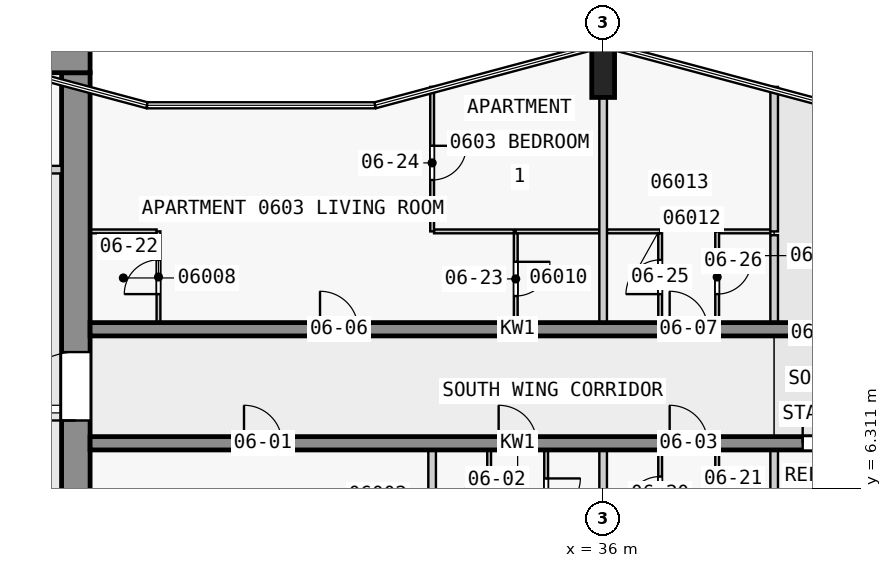
"""IFC4 building model, lengths in metres.
Left out: names, types, materials, properties, quantities, classifications, styles, units other than length and angle.
Written with IfcOpenShell. Run it as: python <this file> out.ifc"""

import sys

from ifc_helpers import new_model, si_unit, direction, frame, frame_2d, origin, origin_2d, place, context, subcontext, project, spatial, rectangle, extrude, element, fill, save


model = new_model("IFC4")
c1 = context("Model", 3, precision=1e-05, world=origin(), true_north=direction((0.0, 1.0)))
c2 = subcontext(c1, "Body", "Model", "MODEL_VIEW")
j1 = project(units=[si_unit("LENGTHUNIT", "METRE"), si_unit("PLANEANGLEUNIT", "RADIAN")], contexts=[c1])
p1 = place(None, origin())
s1 = spatial("IfcSite", under=j1, at=p1, CompositionType="ELEMENT")
p2 = place(p1, origin())
s2 = spatial("IfcBuilding", under=s1, at=p2, CompositionType="ELEMENT")
p3 = place(p2, frame((0.0, 0.0, 30.3)))
s3 = spatial("IfcBuildingStorey", under=s2, at=p3, CompositionType="ELEMENT", Elevation=30.3)
p4 = place(p3, frame((36.0, 17.3, 0.0), z_axis=(0.0, 0.0, 1.0), x_axis=(1.0, 0.0, 0.0)))
e1 = element("IfcColumn", 1, at=p4, inside=s3, PredefinedType="COLUMN", context=c2, shape_type="SweptSolid", body=[
    extrude(rectangle(XDim=0.6, YDim=1.4, at=origin_2d()), origin(), (0.0, 0.0, 1.0), 3.5),
])
p5 = place(p3, frame((1.55, 17.625, 0.0), z_axis=(0.0, 0.0, 1.0), x_axis=(1.0, 0.0, 0.0)))
e2 = element("IfcWall", 2, at=p5, inside=s3, PredefinedType="SHEAR", context=c2, shape_type="SweptSolid", body=[
    extrude(rectangle(XDim=20.95, YDim=0.75, at=frame_2d((10.475, 0.0))), origin(), (0.0, 0.0, 1.0), 3.25),
])
p6 = place(p5, frame((6.55, 0.0, 0.0)))
e3 = element("IfcOpeningElement", 3, at=p6, cuts=e2, PredefinedType="OPENING", context=c2, shape_type="SweptSolid", body=[
    extrude(rectangle(XDim=1.8, YDim=2.1, at=frame_2d((0.9, 1.05))), frame((0.0, 0.385, 0.0), z_axis=(0.0, -1.0, 0.0), x_axis=(1.0, 0.0, 0.0)), (0.0, 0.0, 1.0), 0.77),
])
p7 = place(p3, frame((22.125, 2.5, 0.0), z_axis=(0.0, 0.0, 1.0), x_axis=(0.0, 1.0, 0.0)))
e4 = element("IfcWall", 4, at=p7, inside=s3, PredefinedType="SHEAR", context=c2, shape_type="SweptSolid", body=[
    extrude(rectangle(XDim=14.75, YDim=0.75, at=frame_2d((7.375, 0.0))), origin(), (0.0, 0.0, 1.0), 3.25),
])
p8 = place(p7, frame((5.6, 0.0, 0.0)))
e5 = element("IfcOpeningElement", 5, at=p8, cuts=e4, PredefinedType="OPENING", context=c2, shape_type="SweptSolid", body=[
    extrude(rectangle(XDim=1.8, YDim=2.1, at=frame_2d((0.9, 1.05))), frame((0.0, 0.385, 0.0), z_axis=(0.0, -1.0, 0.0), x_axis=(1.0, 0.0, 0.0)), (0.0, 0.0, 1.0), 0.77),
])
p9 = place(p3, frame((22.5, 7.5, 0.0), z_axis=(0.0, 0.0, 1.0), x_axis=(1.0, 0.0, 0.0)))
e6 = element("IfcWall", 6, at=p9, inside=s3, PredefinedType="SHEAR", context=c2, shape_type="SweptSolid", body=[
    extrude(rectangle(XDim=22.5, YDim=0.35, at=frame_2d((11.25, 0.0))), origin(), (0.0, 0.0, 1.0), 3.25),
])
p10 = place(p9, frame((4.05, 0.0, 0.0)))
e7 = element("IfcOpeningElement", 7, at=p10, cuts=e6, PredefinedType="OPENING", context=c2, shape_type="SweptSolid", body=[
    extrude(rectangle(XDim=1.0, YDim=2.1, at=frame_2d((0.5, 1.05))), frame((0.0, 0.185, 0.0), z_axis=(0.0, -1.0, 0.0), x_axis=(1.0, 0.0, 0.0)), (0.0, 0.0, 1.0), 0.37),
])
p11 = place(p9, frame((10.75, 0.0, 0.0)))
e8 = element("IfcOpeningElement", 8, at=p11, cuts=e6, PredefinedType="OPENING", context=c2, shape_type="SweptSolid", body=[
    extrude(rectangle(XDim=1.0, YDim=2.1, at=frame_2d((0.5, 1.05))), frame((0.0, 0.185, 0.0), z_axis=(0.0, -1.0, 0.0), x_axis=(1.0, 0.0, 0.0)), (0.0, 0.0, 1.0), 0.37),
])
p12 = place(p9, frame((15.25, 0.0, 0.0)))
e9 = element("IfcOpeningElement", 9, at=p12, cuts=e6, PredefinedType="OPENING", context=c2, shape_type="SweptSolid", body=[
    extrude(rectangle(XDim=1.0, YDim=2.1, at=frame_2d((0.5, 1.05))), frame((0.0, 0.185, 0.0), z_axis=(0.0, -1.0, 0.0), x_axis=(1.0, 0.0, 0.0)), (0.0, 0.0, 1.0), 0.37),
])
p13 = place(p9, frame((18.75, 0.0, 0.0)))
e10 = element("IfcOpeningElement", 10, at=p13, cuts=e6, PredefinedType="OPENING", context=c2, shape_type="SweptSolid", body=[
    extrude(rectangle(XDim=0.9, YDim=2.1, at=frame_2d((0.45, 1.05))), frame((0.0, 0.185, 0.0), z_axis=(0.0, -1.0, 0.0), x_axis=(1.0, 0.0, 0.0)), (0.0, 0.0, 1.0), 0.37),
])
p14 = place(p9, frame((20.95, 0.0, 0.0)))
e11 = element("IfcOpeningElement", 11, at=p14, cuts=e6, PredefinedType="OPENING", context=c2, shape_type="SweptSolid", body=[
    extrude(rectangle(XDim=1.0, YDim=2.1, at=frame_2d((0.5, 1.05))), frame((0.0, 0.185, 0.0), z_axis=(0.0, -1.0, 0.0), x_axis=(1.0, 0.0, 0.0)), (0.0, 0.0, 1.0), 0.37),
])
p15 = place(p3, frame((22.5, 10.5, 0.0), z_axis=(0.0, 0.0, 1.0), x_axis=(1.0, 0.0, 0.0)))
e12 = element("IfcWall", 12, at=p15, inside=s3, PredefinedType="SHEAR", context=c2, shape_type="SweptSolid", body=[
    extrude(rectangle(XDim=22.5, YDim=0.35, at=frame_2d((11.25, 0.0))), origin(), (0.0, 0.0, 1.0), 3.25),
])
p16 = place(p15, frame((6.05, 0.0, 0.0)))
e13 = element("IfcOpeningElement", 13, at=p16, cuts=e12, PredefinedType="OPENING", context=c2, shape_type="SweptSolid", body=[
    extrude(rectangle(XDim=1.0, YDim=2.1, at=frame_2d((0.5, 1.05))), frame((0.0, 0.185, 0.0), z_axis=(0.0, -1.0, 0.0), x_axis=(1.0, 0.0, 0.0)), (0.0, 0.0, 1.0), 0.37),
])
p17 = place(p15, frame((15.25, 0.0, 0.0)))
e14 = element("IfcOpeningElement", 14, at=p17, cuts=e12, PredefinedType="OPENING", context=c2, shape_type="SweptSolid", body=[
    extrude(rectangle(XDim=1.0, YDim=2.1, at=frame_2d((0.5, 1.05))), frame((0.0, 0.185, 0.0), z_axis=(0.0, -1.0, 0.0), x_axis=(1.0, 0.0, 0.0)), (0.0, 0.0, 1.0), 0.37),
])
p18 = place(p15, frame((19.75, 0.0, 0.0)))
e15 = element("IfcOpeningElement", 15, at=p18, cuts=e12, PredefinedType="OPENING", context=c2, shape_type="SweptSolid", body=[
    extrude(rectangle(XDim=1.0, YDim=2.1, at=frame_2d((0.5, 1.05))), frame((0.0, 0.185, 0.0), z_axis=(0.0, -1.0, 0.0), x_axis=(1.0, 0.0, 0.0)), (0.0, 0.0, 1.0), 0.37),
])
p19 = place(p3, frame((18.6, 14.7, 0.0), z_axis=(0.0, 0.0, 1.0), x_axis=(1.0, 0.0, 0.0)))
e16 = element("IfcWall", 16, at=p19, inside=s3, PredefinedType="PARTITIONING", context=c2, shape_type="SweptSolid", body=[
    extrude(rectangle(XDim=3.15, YDim=0.2, at=frame_2d((1.575, 0.0))), origin(), (0.0, 0.0, 1.0), 3.25),
])
p20 = place(p19, frame((0.15, 0.0, 0.0)))
e17 = element("IfcOpeningElement", 17, at=p20, cuts=e16, PredefinedType="OPENING", context=c2, shape_type="SweptSolid", body=[
    extrude(rectangle(XDim=0.9, YDim=2.1, at=frame_2d((0.45, 1.05))), frame((0.0, 0.11, 0.0), z_axis=(0.0, -1.0, 0.0), x_axis=(1.0, 0.0, 0.0)), (0.0, 0.0, 1.0), 0.22),
])
p21 = place(p19, frame((1.725, 0.0, 0.0)))
e18 = element("IfcOpeningElement", 18, at=p21, cuts=e16, PredefinedType="OPENING", context=c2, shape_type="SweptSolid", body=[
    extrude(rectangle(XDim=0.9, YDim=2.1, at=frame_2d((0.45, 1.05))), frame((0.0, 0.11, 0.0), z_axis=(0.0, -1.0, 0.0), x_axis=(1.0, 0.0, 0.0)), (0.0, 0.0, 1.0), 0.22),
])
p22 = place(p3, frame((24.25, 13.075, 0.0), z_axis=(0.0, 0.0, 1.0), x_axis=(-1.0, 0.0, 0.0)))
e19 = element("IfcWall", 19, at=p22, inside=s3, PredefinedType="PARTITIONING", context=c2, shape_type="SweptSolid", body=[
    extrude(rectangle(XDim=1.75, YDim=0.1, at=frame_2d((0.875, 0.0))), origin(), (0.0, 0.0, 1.0), 3.25),
])
p23 = place(p3, frame((35.9, 13.075, 0.0), z_axis=(0.0, 0.0, 1.0), x_axis=(-1.0, 0.0, 0.0)))
e20 = element("IfcWall", 20, at=p23, inside=s3, PredefinedType="PARTITIONING", context=c2, shape_type="SweptSolid", body=[
    extrude(rectangle(XDim=2.2, YDim=0.1, at=frame_2d((1.1, 0.0))), origin(), (0.0, 0.0, 1.0), 3.25),
])
p24 = place(p3, frame((37.5, 13.075, 0.0), z_axis=(0.0, 0.0, 1.0), x_axis=(-1.0, 0.0, 0.0)))
e21 = element("IfcWall", 21, at=p24, inside=s3, PredefinedType="PARTITIONING", context=c2, shape_type="SweptSolid", body=[
    extrude(rectangle(XDim=1.4, YDim=0.1, at=frame_2d((0.7, 0.0))), origin(), (0.0, 0.0, 1.0), 3.25),
])
p25 = place(p3, frame((40.4, 13.075, 0.0), z_axis=(0.0, 0.0, 1.0), x_axis=(-1.0, 0.0, 0.0)))
e22 = element("IfcWall", 22, at=p25, inside=s3, PredefinedType="PARTITIONING", context=c2, shape_type="SweptSolid", body=[
    extrude(rectangle(XDim=1.35, YDim=0.1, at=frame_2d((0.675, 0.0))), origin(), (0.0, 0.0, 1.0), 3.25),
])
p26 = place(p3, frame((31.55, 13.075, 0.0), z_axis=(0.0, 0.0, 1.0), x_axis=(1.0, 0.0, 0.0)))
e23 = element("IfcWall", 23, at=p26, inside=s3, PredefinedType="PARTITIONING", context=c2, shape_type="SweptSolid", body=[
    extrude(rectangle(XDim=2.1, YDim=0.1, at=frame_2d((1.05, 0.0))), origin(), (0.0, 0.0, 1.0), 3.25),
])
p27 = place(p3, frame((24.3, 10.675, 0.0), z_axis=(0.0, 0.0, 1.0), x_axis=(0.0, 1.0, 0.0)))
e24 = element("IfcWall", 24, at=p27, inside=s3, PredefinedType="PARTITIONING", context=c2, shape_type="SweptSolid", body=[
    extrude(rectangle(XDim=2.4, YDim=0.1, at=frame_2d((1.2, 0.0))), origin(), (0.0, 0.0, 1.0), 3.25),
])
p28 = place(p27, frame((0.75, 0.0, 0.0)))
e25 = element("IfcOpeningElement", 25, at=p28, cuts=e24, PredefinedType="OPENING", context=c2, shape_type="SweptSolid", body=[
    extrude(rectangle(XDim=0.9, YDim=2.1, at=frame_2d((0.45, 1.05))), frame((0.0, 0.06, 0.0), z_axis=(0.0, -1.0, 0.0), x_axis=(1.0, 0.0, 0.0)), (0.0, 0.0, 1.0), 0.12),
])
p29 = place(p3, frame((31.5, 16.878, 0.0), z_axis=(0.0, 0.0, 1.0), x_axis=(0.0, -1.0, 0.0)))
e26 = element("IfcWall", 26, at=p29, inside=s3, PredefinedType="PARTITIONING", context=c2, shape_type="SweptSolid", body=[
    extrude(rectangle(XDim=3.803, YDim=0.1, at=frame_2d((1.901, 0.0))), origin(), (0.0, 0.0, 1.0), 3.25),
])
p30 = place(p29, frame((1.55, 0.0, 0.0)))
e27 = element("IfcOpeningElement", 27, at=p30, cuts=e26, PredefinedType="OPENING", context=c2, shape_type="SweptSolid", body=[
    extrude(rectangle(XDim=0.9, YDim=2.1, at=frame_2d((0.45, 1.05))), frame((0.0, 0.06, 0.0), z_axis=(0.0, -1.0, 0.0), x_axis=(1.0, 0.0, 0.0)), (0.0, 0.0, 1.0), 0.12),
])
p31 = place(p3, frame((31.5, 1.122, 0.0), z_axis=(0.0, 0.0, 1.0), x_axis=(0.0, 1.0, 0.0)))
e28 = element("IfcWall", 28, at=p31, inside=s3, PredefinedType="PARTITIONING", context=c2, shape_type="SweptSolid", body=[
    extrude(rectangle(XDim=6.203, YDim=0.2, at=frame_2d((3.101, 0.0))), origin(), (0.0, 0.0, 1.0), 3.25),
])
p32 = place(p3, frame((33.0, 4.925, 0.0), z_axis=(0.0, 0.0, 1.0), x_axis=(0.0, 1.0, 0.0)))
e29 = element("IfcWall", 29, at=p32, inside=s3, PredefinedType="PARTITIONING", context=c2, shape_type="SweptSolid", body=[
    extrude(rectangle(XDim=2.4, YDim=0.1, at=frame_2d((1.2, 0.0))), origin(), (0.0, 0.0, 1.0), 3.25),
])
p33 = place(p32, frame((0.75, 0.0, 0.0)))
e30 = element("IfcOpeningElement", 30, at=p33, cuts=e29, PredefinedType="OPENING", context=c2, shape_type="SweptSolid", body=[
    extrude(rectangle(XDim=0.9, YDim=2.1, at=frame_2d((0.45, 1.05))), frame((0.0, 0.06, 0.0), z_axis=(0.0, -1.0, 0.0), x_axis=(1.0, 0.0, 0.0)), (0.0, 0.0, 1.0), 0.12),
])
p34 = place(p3, frame((33.7, 13.025, 0.0), z_axis=(0.0, 0.0, 1.0), x_axis=(0.0, -1.0, 0.0)))
e31 = element("IfcWall", 31, at=p34, inside=s3, PredefinedType="PARTITIONING", context=c2, shape_type="SweptSolid", body=[
    extrude(rectangle(XDim=2.35, YDim=0.1, at=frame_2d((1.175, 0.0))), origin(), (0.0, 0.0, 1.0), 3.25),
])
p35 = place(p34, frame((0.75, 0.0, 0.0)))
e32 = element("IfcOpeningElement", 32, at=p35, cuts=e31, PredefinedType="OPENING", context=c2, shape_type="SweptSolid", body=[
    extrude(rectangle(XDim=0.9, YDim=2.1, at=frame_2d((0.45, 1.05))), frame((0.0, 0.06, 0.0), z_axis=(0.0, -1.0, 0.0), x_axis=(1.0, 0.0, 0.0)), (0.0, 0.0, 1.0), 0.12),
])
p36 = place(p3, frame((34.5, 7.325, 0.0), z_axis=(0.0, 0.0, 1.0), x_axis=(0.0, -1.0, 0.0)))
e33 = element("IfcWall", 33, at=p36, inside=s3, PredefinedType="PARTITIONING", context=c2, shape_type="SweptSolid", body=[
    extrude(rectangle(XDim=2.35, YDim=0.1, at=frame_2d((1.175, 0.0))), origin(), (0.0, 0.0, 1.0), 3.25),
])
p37 = place(p36, frame((0.75, 0.0, 0.0)))
e34 = element("IfcOpeningElement", 34, at=p37, cuts=e33, PredefinedType="OPENING", context=c2, shape_type="SweptSolid", body=[
    extrude(rectangle(XDim=0.9, YDim=2.1, at=frame_2d((0.45, 1.05))), frame((0.0, 0.06, 0.0), z_axis=(0.0, -1.0, 0.0), x_axis=(1.0, 0.0, 0.0)), (0.0, 0.0, 1.0), 0.12),
])
p38 = place(p3, frame((36.0, 5.025, 0.0), z_axis=(0.0, 0.0, 1.0), x_axis=(0.0, 1.0, 0.0)))
e35 = element("IfcWall", 35, at=p38, inside=s3, PredefinedType="PARTITIONING", context=c2, shape_type="SweptSolid", body=[
    extrude(rectangle(XDim=2.3, YDim=0.2, at=frame_2d((1.15, 0.0))), origin(), (0.0, 0.0, 1.0), 3.25),
])
p39 = place(p3, frame((36.0, 10.675, 0.0), z_axis=(0.0, 0.0, 1.0), x_axis=(0.0, 1.0, 0.0)))
e36 = element("IfcWall", 36, at=p39, inside=s3, PredefinedType="PARTITIONING", context=c2, shape_type="SweptSolid", body=[
    extrude(rectangle(XDim=5.925, YDim=0.2, at=frame_2d((2.962, 0.0))), origin(), (0.0, 0.0, 1.0), 3.25),
])
p40 = place(p3, frame((37.5, 4.975, 0.0), z_axis=(0.0, 0.0, 1.0), x_axis=(0.0, 1.0, 0.0)))
e37 = element("IfcWall", 37, at=p40, inside=s3, PredefinedType="PARTITIONING", context=c2, shape_type="SweptSolid", body=[
    extrude(rectangle(XDim=2.35, YDim=0.1, at=frame_2d((1.175, 0.0))), origin(), (0.0, 0.0, 1.0), 3.25),
])
p41 = place(p40, frame((0.75, 0.0, 0.0)))
e38 = element("IfcOpeningElement", 38, at=p41, cuts=e37, PredefinedType="OPENING", context=c2, shape_type="SweptSolid", body=[
    extrude(rectangle(XDim=0.9, YDim=2.1, at=frame_2d((0.45, 1.05))), frame((0.0, 0.06, 0.0), z_axis=(0.0, -1.0, 0.0), x_axis=(1.0, 0.0, 0.0)), (0.0, 0.0, 1.0), 0.12),
])
p42 = place(p3, frame((37.5, 10.675, 0.0), z_axis=(0.0, 0.0, 1.0), x_axis=(0.0, 1.0, 0.0)))
e39 = element("IfcWall", 39, at=p42, inside=s3, PredefinedType="PARTITIONING", context=c2, shape_type="SweptSolid", body=[
    extrude(rectangle(XDim=2.35, YDim=0.1, at=frame_2d((1.175, 0.0))), origin(), (0.0, 0.0, 1.0), 3.25),
])
p43 = place(p42, frame((0.75, 0.0, 0.0)))
e40 = element("IfcOpeningElement", 40, at=p43, cuts=e39, PredefinedType="OPENING", context=c2, shape_type="SweptSolid", body=[
    extrude(rectangle(XDim=0.9, YDim=2.1, at=frame_2d((0.45, 1.05))), frame((0.0, 0.06, 0.0), z_axis=(0.0, -1.0, 0.0), x_axis=(1.0, 0.0, 0.0)), (0.0, 0.0, 1.0), 0.12),
])
p44 = place(p3, frame((39.0, 7.325, 0.0), z_axis=(0.0, 0.0, 1.0), x_axis=(0.0, -1.0, 0.0)))
e41 = element("IfcWall", 41, at=p44, inside=s3, PredefinedType="PARTITIONING", context=c2, shape_type="SweptSolid", body=[
    extrude(rectangle(XDim=2.4, YDim=0.1, at=frame_2d((1.2, 0.0))), origin(), (0.0, 0.0, 1.0), 3.25),
])
p45 = place(p44, frame((0.75, 0.0, 0.0)))
e42 = element("IfcOpeningElement", 42, at=p45, cuts=e41, PredefinedType="OPENING", context=c2, shape_type="SweptSolid", body=[
    extrude(rectangle(XDim=0.9, YDim=2.1, at=frame_2d((0.45, 1.05))), frame((0.0, 0.06, 0.0), z_axis=(0.0, -1.0, 0.0), x_axis=(1.0, 0.0, 0.0)), (0.0, 0.0, 1.0), 0.12),
])
p46 = place(p3, frame((39.0, 13.075, 0.0), z_axis=(0.0, 0.0, 1.0), x_axis=(0.0, -1.0, 0.0)))
e43 = element("IfcWall", 43, at=p46, inside=s3, PredefinedType="PARTITIONING", context=c2, shape_type="SweptSolid", body=[
    extrude(rectangle(XDim=2.4, YDim=0.1, at=frame_2d((1.2, 0.0))), origin(), (0.0, 0.0, 1.0), 3.25),
])
p47 = place(p46, frame((0.75, 0.0, 0.0)))
e44 = element("IfcOpeningElement", 44, at=p47, cuts=e43, PredefinedType="OPENING", context=c2, shape_type="SweptSolid", body=[
    extrude(rectangle(XDim=0.9, YDim=2.1, at=frame_2d((0.45, 1.05))), frame((0.0, 0.06, 0.0), z_axis=(0.0, -1.0, 0.0), x_axis=(1.0, 0.0, 0.0)), (0.0, 0.0, 1.0), 0.12),
])
p48 = place(p3, frame((40.5, 16.878, 0.0), z_axis=(0.0, 0.0, 1.0), x_axis=(0.0, -1.0, 0.0)))
e45 = element("IfcWall", 45, at=p48, inside=s3, PredefinedType="PARTITIONING", context=c2, shape_type="SweptSolid", body=[
    extrude(rectangle(XDim=3.803, YDim=0.2, at=frame_2d((1.901, 0.0))), origin(), (0.0, 0.0, 1.0), 3.25),
])
for number, where, z_axis, x_axis in (
    (46, (40.5, 5.025, 0.0), (0.0, 0.0, 1.0), (0.0, 1.0, 0.0)),
    (47, (40.5, 10.675, 0.0), (0.0, 0.0, 1.0), (0.0, 1.0, 0.0)),
):
    element("IfcWall", number, at=place(p3, frame(where, z_axis=z_axis, x_axis=x_axis)), inside=s3, PredefinedType="PARTITIONING", context=c2, shape_type="SweptSolid", body=[
        extrude(rectangle(XDim=2.3, YDim=0.2, at=frame_2d((1.15, 0.0))), origin(), (0.0, 0.0, 1.0), 3.25),
    ])
p49 = place(p8, origin())
e48 = element("IfcDoor", 48, at=p49, inside=s3, OperationType="DOUBLE_DOOR_SINGLE_SWING", PredefinedType="DOOR", context=c2, shape_type="SweptSolid", body=[
    extrude(rectangle(XDim=1.8, YDim=2.1, at=frame_2d((0.9, 1.05))), frame((0.0, 0.025, 0.0), z_axis=(0.0, -1.0, 0.0), x_axis=(1.0, 0.0, 0.0)), (0.0, 0.0, 1.0), 0.05),
])
fill(e5, e48)
p50 = place(p10, origin())
e49 = element("IfcDoor", 49, at=p50, inside=s3, OperationType="SINGLE_SWING_LEFT", PredefinedType="DOOR", context=c2, shape_type="SweptSolid", body=[
    extrude(rectangle(XDim=1.0, YDim=2.1, at=frame_2d((0.5, 1.05))), frame((0.0, 0.025, 0.0), z_axis=(0.0, -1.0, 0.0), x_axis=(1.0, 0.0, 0.0)), (0.0, 0.0, 1.0), 0.05),
])
fill(e7, e49)
p51 = place(p11, origin())
e50 = element("IfcDoor", 50, at=p51, inside=s3, OperationType="SINGLE_SWING_LEFT", PredefinedType="DOOR", context=c2, shape_type="SweptSolid", body=[
    extrude(rectangle(XDim=1.0, YDim=2.1, at=frame_2d((0.5, 1.05))), frame((0.0, 0.025, 0.0), z_axis=(0.0, -1.0, 0.0), x_axis=(1.0, 0.0, 0.0)), (0.0, 0.0, 1.0), 0.05),
])
fill(e8, e50)
p52 = place(p12, origin())
e51 = element("IfcDoor", 51, at=p52, inside=s3, OperationType="SINGLE_SWING_RIGHT", PredefinedType="DOOR", context=c2, shape_type="SweptSolid", body=[
    extrude(rectangle(XDim=1.0, YDim=2.1, at=frame_2d((0.5, 1.05))), frame((0.0, 0.025, 0.0), z_axis=(0.0, -1.0, 0.0), x_axis=(1.0, 0.0, 0.0)), (0.0, 0.0, 1.0), 0.05),
])
fill(e9, e51)
p53 = place(p13, origin())
e52 = element("IfcDoor", 52, at=p53, inside=s3, OperationType="SINGLE_SWING_RIGHT", PredefinedType="DOOR", context=c2, shape_type="SweptSolid", body=[
    extrude(rectangle(XDim=0.9, YDim=2.1, at=frame_2d((0.45, 1.05))), frame((0.0, 0.025, 0.0), z_axis=(0.0, -1.0, 0.0), x_axis=(1.0, 0.0, 0.0)), (0.0, 0.0, 1.0), 0.05),
])
fill(e10, e52)
p54 = place(p16, origin())
e53 = element("IfcDoor", 53, at=p54, inside=s3, OperationType="SINGLE_SWING_LEFT", PredefinedType="DOOR", context=c2, shape_type="SweptSolid", body=[
    extrude(rectangle(XDim=1.0, YDim=2.1, at=frame_2d((0.5, 1.05))), frame((0.0, 0.025, 0.0), z_axis=(0.0, -1.0, 0.0), x_axis=(1.0, 0.0, 0.0)), (0.0, 0.0, 1.0), 0.05),
])
fill(e13, e53)
p55 = place(p17, origin())
e54 = element("IfcDoor", 54, at=p55, inside=s3, OperationType="SINGLE_SWING_RIGHT", PredefinedType="DOOR", context=c2, shape_type="SweptSolid", body=[
    extrude(rectangle(XDim=1.0, YDim=2.1, at=frame_2d((0.5, 1.05))), frame((0.0, 0.025, 0.0), z_axis=(0.0, -1.0, 0.0), x_axis=(1.0, 0.0, 0.0)), (0.0, 0.0, 1.0), 0.05),
])
fill(e14, e54)
p56 = place(p33, origin())
e55 = element("IfcDoor", 55, at=p56, inside=s3, OperationType="SINGLE_SWING_LEFT", PredefinedType="DOOR", context=c2, shape_type="SweptSolid", body=[
    extrude(rectangle(XDim=0.9, YDim=2.1, at=frame_2d((0.45, 1.05))), frame((0.0, 0.025, 0.0), z_axis=(0.0, -1.0, 0.0), x_axis=(1.0, 0.0, 0.0)), (0.0, 0.0, 1.0), 0.05),
])
fill(e30, e55)
p57 = place(p37, origin())
e56 = element("IfcDoor", 56, at=p57, inside=s3, OperationType="SINGLE_SWING_RIGHT", PredefinedType="DOOR", context=c2, shape_type="SweptSolid", body=[
    extrude(rectangle(XDim=0.9, YDim=2.1, at=frame_2d((0.45, 1.05))), frame((0.0, 0.025, 0.0), z_axis=(0.0, -1.0, 0.0), x_axis=(1.0, 0.0, 0.0)), (0.0, 0.0, 1.0), 0.05),
])
fill(e34, e56)
p58 = place(p41, origin())
e57 = element("IfcDoor", 57, at=p58, inside=s3, OperationType="SINGLE_SWING_RIGHT", PredefinedType="DOOR", context=c2, shape_type="SweptSolid", body=[
    extrude(rectangle(XDim=0.9, YDim=2.1, at=frame_2d((0.45, 1.05))), frame((0.0, 0.025, 0.0), z_axis=(0.0, -1.0, 0.0), x_axis=(1.0, 0.0, 0.0)), (0.0, 0.0, 1.0), 0.05),
])
fill(e38, e57)
p59 = place(p45, origin())
e58 = element("IfcDoor", 58, at=p59, inside=s3, OperationType="SINGLE_SWING_LEFT", PredefinedType="DOOR", context=c2, shape_type="SweptSolid", body=[
    extrude(rectangle(XDim=0.9, YDim=2.1, at=frame_2d((0.45, 1.05))), frame((0.0, 0.025, 0.0), z_axis=(0.0, -1.0, 0.0), x_axis=(1.0, 0.0, 0.0)), (0.0, 0.0, 1.0), 0.05),
])
fill(e42, e58)
p60 = place(p28, origin())
e59 = element("IfcDoor", 59, at=p60, inside=s3, OperationType="SINGLE_SWING_RIGHT", PredefinedType="DOOR", context=c2, shape_type="SweptSolid", body=[
    extrude(rectangle(XDim=0.9, YDim=2.1, at=frame_2d((0.45, 1.05))), frame((0.0, 0.025, 0.0), z_axis=(0.0, -1.0, 0.0), x_axis=(1.0, 0.0, 0.0)), (0.0, 0.0, 1.0), 0.05),
])
fill(e25, e59)
p61 = place(p35, origin())
e60 = element("IfcDoor", 60, at=p61, inside=s3, OperationType="SINGLE_SWING_RIGHT", PredefinedType="DOOR", context=c2, shape_type="SweptSolid", body=[
    extrude(rectangle(XDim=0.9, YDim=2.1, at=frame_2d((0.45, 1.05))), frame((0.0, 0.025, 0.0), z_axis=(0.0, -1.0, 0.0), x_axis=(1.0, 0.0, 0.0)), (0.0, 0.0, 1.0), 0.05),
])
fill(e32, e60)
p62 = place(p30, origin())
e61 = element("IfcDoor", 61, at=p62, inside=s3, OperationType="SINGLE_SWING_RIGHT", PredefinedType="DOOR", context=c2, shape_type="SweptSolid", body=[
    extrude(rectangle(XDim=0.9, YDim=2.1, at=frame_2d((0.45, 1.05))), frame((0.0, 0.025, 0.0), z_axis=(0.0, -1.0, 0.0), x_axis=(1.0, 0.0, 0.0)), (0.0, 0.0, 1.0), 0.05),
])
fill(e27, e61)
p63 = place(p43, origin())
e62 = element("IfcDoor", 62, at=p63, inside=s3, OperationType="SINGLE_SWING_RIGHT", PredefinedType="DOOR", context=c2, shape_type="SweptSolid", body=[
    extrude(rectangle(XDim=0.9, YDim=2.1, at=frame_2d((0.45, 1.05))), frame((0.0, 0.025, 0.0), z_axis=(0.0, -1.0, 0.0), x_axis=(1.0, 0.0, 0.0)), (0.0, 0.0, 1.0), 0.05),
])
fill(e40, e62)
p64 = place(p47, origin())
e63 = element("IfcDoor", 63, at=p64, inside=s3, OperationType="SINGLE_SWING_RIGHT", PredefinedType="DOOR", context=c2, shape_type="SweptSolid", body=[
    extrude(rectangle(XDim=0.9, YDim=2.1, at=frame_2d((0.45, 1.05))), frame((0.0, 0.025, 0.0), z_axis=(0.0, -1.0, 0.0), x_axis=(1.0, 0.0, 0.0)), (0.0, 0.0, 1.0), 0.05),
])
fill(e44, e63)
save(model, sys.argv[1])
